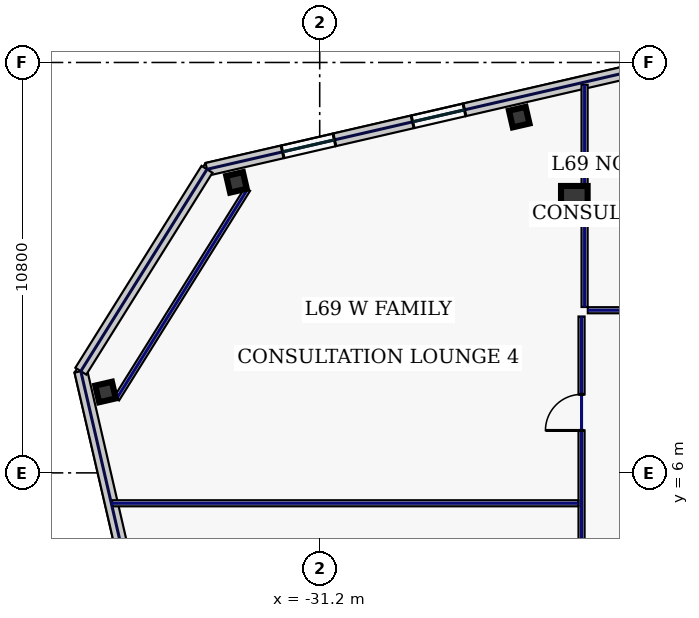
"""IFC4 building model, lengths in metres.
Left out: names, types, materials, properties, quantities, classifications, styles, units other than length and angle.
Written with IfcOpenShell. Run it as: python <this file> out.ifc"""

import sys

from ifc_helpers import new_model, si_unit, direction, frame, frame_2d, origin, origin_2d, place, context, subcontext, project, spatial, rectangle, hollow_rectangle, extrude, element, fill, save


model = new_model("IFC4")
c1 = context("Model", 3, precision=1e-05, world=origin(), true_north=direction((0.0, 1.0)))
c2 = subcontext(c1, "Body", "Model", "MODEL_VIEW")
j1 = project(units=[si_unit("LENGTHUNIT", "METRE"), si_unit("PLANEANGLEUNIT", "RADIAN")], contexts=[c1])
p1 = place(None, origin())
s1 = spatial("IfcSite", under=j1, at=p1, CompositionType="ELEMENT")
p2 = place(p1, origin())
s2 = spatial("IfcBuilding", under=s1, at=p2, CompositionType="ELEMENT")
p3 = place(p2, frame((0.0, 0.0, 297.0)))
s3 = spatial("IfcBuildingStorey", under=s2, at=p3, CompositionType="ELEMENT", Elevation=297.0)
p4 = place(p3, frame((-24.5, 13.2, 0.0), z_axis=(0.0, 0.0, 1.0), x_axis=(1.0, 0.0, 0.0)))
e1 = element("IfcColumn", 1, at=p4, inside=s3, PredefinedType="COLUMN", context=c2, shape_type="SweptSolid", body=[
    extrude(hollow_rectangle(XDim=0.7, YDim=0.7, WallThickness=0.032, at=origin_2d()), origin(), (0.0, 0.0, 1.0), 3.74),
])
for number, where, z_axis, x_axis in (
    (2, (-25.95, 15.362, 0.0), (0.0, 0.0, 1.0), (0.974, 0.225, 0.0)),
    (3, (-33.389, 13.645, 0.0), (0.0, 0.0, 1.0), (0.974, 0.225, 0.0)),
    (4, (-36.836, 8.128, 0.0), (0.0, 0.0, 1.0), (0.974, 0.225, 0.0)),
):
    element("IfcColumn", number, at=place(p3, frame(where, z_axis=z_axis, x_axis=x_axis)), inside=s3, PredefinedType="COLUMN", context=c2, shape_type="SweptSolid", body=[
        extrude(hollow_rectangle(XDim=0.45, YDim=0.45, WallThickness=0.022, at=origin_2d()), origin(), (0.0, 0.0, 1.0), 3.74),
    ])
p5 = place(p3, frame((-17.245, 17.895, 0.0), z_axis=(0.0, 0.0, 1.0), x_axis=(-0.97437318493, -0.224937539085, 0.0)))
e5 = element("IfcWall", 5, at=p5, inside=s3, PredefinedType="STANDARD", context=c2, shape_type="SweptSolid", body=[
    extrude(rectangle(XDim=17.366, YDim=0.34, at=frame_2d((8.683, 0.0))), origin(), (0.0, 0.0, 1.0), 3.74),
])
p6 = place(p5, frame((13.925, 0.0, 1.0)))
e6 = element("IfcOpeningElement", 6, at=p6, cuts=e5, PredefinedType="OPENING", context=c2, shape_type="SweptSolid", body=[
    extrude(rectangle(XDim=1.4, YDim=1.85, at=frame_2d((0.7, 0.925))), frame((0.0, 0.18, 0.0), z_axis=(0.0, -1.0, 0.0), x_axis=(1.0, 0.0, 0.0)), (0.0, 0.0, 1.0), 0.36),
])
p7 = place(p5, frame((10.413, 0.0, 1.0)))
e7 = element("IfcOpeningElement", 7, at=p7, cuts=e5, PredefinedType="OPENING", context=c2, shape_type="SweptSolid", body=[
    extrude(rectangle(XDim=1.4, YDim=1.85, at=frame_2d((0.7, 0.925))), frame((0.0, 0.18, 0.0), z_axis=(0.0, -1.0, 0.0), x_axis=(1.0, 0.0, 0.0)), (0.0, 0.0, 1.0), 0.36),
])
p8 = place(p5, frame((3.329, 0.0, 1.0)))
e8 = element("IfcOpeningElement", 8, at=p8, cuts=e5, PredefinedType="OPENING", context=c2, shape_type="SweptSolid", body=[
    extrude(rectangle(XDim=0.85, YDim=1.85, at=frame_2d((0.425, 0.925))), frame((0.0, 0.18, 0.0), z_axis=(0.0, -1.0, 0.0), x_axis=(1.0, 0.0, 0.0)), (0.0, 0.0, 1.0), 0.36),
])
p9 = place(p3, frame((-37.486, 8.676, 0.0), z_axis=(0.0, 0.0, 1.0), x_axis=(0.224953091034, -0.974369594576, 0.0)))
e9 = element("IfcWall", 9, at=p9, inside=s3, PredefinedType="STANDARD", context=c2, shape_type="SweptSolid", body=[
    extrude(rectangle(XDim=36.2, YDim=0.34, at=frame_2d((18.1, 0.0))), origin(), (0.0, 0.0, 1.0), 3.74),
])
p10 = place(p9, frame((4.825, 0.0, 0.75)))
e10 = element("IfcOpeningElement", 10, at=p10, cuts=e9, PredefinedType="OPENING", context=c2, shape_type="SweptSolid", body=[
    extrude(rectangle(XDim=0.85, YDim=1.85, at=frame_2d((0.425, 0.925))), frame((0.0, 0.18, 0.0), z_axis=(0.0, -1.0, 0.0), x_axis=(1.0, 0.0, 0.0)), (0.0, 0.0, 1.0), 0.36),
])
p11 = place(p9, frame((12.425, 0.0, 0.75)))
e11 = element("IfcOpeningElement", 11, at=p11, cuts=e9, PredefinedType="OPENING", context=c2, shape_type="SweptSolid", body=[
    extrude(rectangle(XDim=0.85, YDim=1.85, at=frame_2d((0.425, 0.925))), frame((0.0, 0.18, 0.0), z_axis=(0.0, -1.0, 0.0), x_axis=(1.0, 0.0, 0.0)), (0.0, 0.0, 1.0), 0.36),
])
p12 = place(p9, frame((21.825, 0.0, 0.58)))
e12 = element("IfcOpeningElement", 12, at=p12, cuts=e9, PredefinedType="OPENING", context=c2, shape_type="SweptSolid", body=[
    extrude(rectangle(XDim=1.6, YDim=2.3, at=frame_2d((0.8, 1.15))), frame((0.0, 0.18, 0.0), z_axis=(0.0, -1.0, 0.0), x_axis=(1.0, 0.0, 0.0)), (0.0, 0.0, 1.0), 0.36),
])
p13 = place(p9, frame((30.875, 0.0, 0.58)))
e13 = element("IfcOpeningElement", 13, at=p13, cuts=e9, PredefinedType="OPENING", context=c2, shape_type="SweptSolid", body=[
    extrude(rectangle(XDim=1.6, YDim=2.3, at=frame_2d((0.8, 1.15))), frame((0.0, 0.18, 0.0), z_axis=(0.0, -1.0, 0.0), x_axis=(1.0, 0.0, 0.0)), (0.0, 0.0, 1.0), 0.36),
])
p14 = place(p3, frame((-34.166, 13.989, 0.0), z_axis=(0.0, 0.0, 1.0), x_axis=(-0.529935887993, -0.848037708252, 0.0)))
e14 = element("IfcWall", 14, at=p14, inside=s3, PredefinedType="STANDARD", context=c2, shape_type="SweptSolid", body=[
    extrude(rectangle(XDim=6.265, YDim=0.34, at=frame_2d((3.133, 0.0))), origin(), (0.0, 0.0, 1.0), 3.74),
])
p15 = place(p3, frame((-33.1, 13.465, 0.0), z_axis=(0.0, 0.0, 1.0), x_axis=(-0.529958457806, -0.848023604035, 0.0)))
e15 = element("IfcWall", 15, at=p15, inside=s3, PredefinedType="PARTITIONING", context=c2, shape_type="SweptSolid", body=[
    extrude(rectangle(XDim=6.505, YDim=0.16, at=frame_2d((3.252, 0.0))), origin(), (0.0, 0.0, 1.0), 3.74),
])
p16 = place(p3, frame((-24.31, -10.015, 0.0), z_axis=(0.0, 0.0, 1.0), x_axis=(0.0, 1.0, 0.0)))
e16 = element("IfcWall", 16, at=p16, inside=s3, PredefinedType="PARTITIONING", context=c2, shape_type="SweptSolid", body=[
    extrude(rectangle(XDim=20.13, YDim=0.16, at=frame_2d((10.065, 0.0))), origin(), (0.0, 0.0, 1.0), 3.74),
])
p17 = place(p16, frame((2.169, 0.0, 0.0)))
e17 = element("IfcOpeningElement", 17, at=p17, cuts=e16, PredefinedType="OPENING", context=c2, shape_type="SweptSolid", body=[
    extrude(rectangle(XDim=0.95, YDim=2.2, at=frame_2d((0.475, 1.1))), frame((0.0, 0.09, 0.0), z_axis=(0.0, -1.0, 0.0), x_axis=(1.0, 0.0, 0.0)), (0.0, 0.0, 1.0), 0.18),
])
p18 = place(p16, frame((6.4, 0.0, 0.0)))
e18 = element("IfcOpeningElement", 18, at=p18, cuts=e16, PredefinedType="OPENING", context=c2, shape_type="SweptSolid", body=[
    extrude(rectangle(XDim=0.95, YDim=2.2, at=frame_2d((0.475, 1.1))), frame((0.0, 0.09, 0.0), z_axis=(0.0, -1.0, 0.0), x_axis=(1.0, 0.0, 0.0)), (0.0, 0.0, 1.0), 0.18),
])
p19 = place(p16, frame((11.6, 0.0, 0.0)))
e19 = element("IfcOpeningElement", 19, at=p19, cuts=e16, PredefinedType="OPENING", context=c2, shape_type="SweptSolid", body=[
    extrude(rectangle(XDim=0.95, YDim=2.2, at=frame_2d((0.475, 1.1))), frame((0.0, 0.09, 0.0), z_axis=(0.0, -1.0, 0.0), x_axis=(1.0, 0.0, 0.0)), (0.0, 0.0, 1.0), 0.18),
])
p20 = place(p16, frame((17.131, 0.0, 0.0)))
e20 = element("IfcOpeningElement", 20, at=p20, cuts=e16, PredefinedType="OPENING", context=c2, shape_type="SweptSolid", body=[
    extrude(rectangle(XDim=0.95, YDim=2.2, at=frame_2d((0.475, 1.1))), frame((0.0, 0.09, 0.0), z_axis=(0.0, -1.0, 0.0), x_axis=(1.0, 0.0, 0.0)), (0.0, 0.0, 1.0), 0.18),
])
p21 = place(p3, frame((-24.145, 10.28, 0.0), z_axis=(0.0, 0.0, 1.0), x_axis=(1.0, 0.0, 0.0)))
e21 = element("IfcWall", 21, at=p21, inside=s3, PredefinedType="PARTITIONING", context=c2, shape_type="SweptSolid", body=[
    extrude(rectangle(XDim=48.29, YDim=0.16, at=frame_2d((24.145, 0.0))), origin(), (0.0, 0.0, 1.0), 3.74),
])
p22 = place(p21, frame((2.044, 0.0, 0.0)))
e22 = element("IfcOpeningElement", 22, at=p22, cuts=e21, PredefinedType="OPENING", context=c2, shape_type="SweptSolid", body=[
    extrude(rectangle(XDim=0.95, YDim=2.2, at=frame_2d((0.475, 1.1))), frame((0.0, 0.09, 0.0), z_axis=(0.0, -1.0, 0.0), x_axis=(1.0, 0.0, 0.0)), (0.0, 0.0, 1.0), 0.18),
])
p23 = place(p21, frame((6.885, 0.0, 0.0)))
e23 = element("IfcOpeningElement", 23, at=p23, cuts=e21, PredefinedType="OPENING", context=c2, shape_type="SweptSolid", body=[
    extrude(rectangle(XDim=0.95, YDim=2.2, at=frame_2d((0.475, 1.1))), frame((0.0, 0.09, 0.0), z_axis=(0.0, -1.0, 0.0), x_axis=(1.0, 0.0, 0.0)), (0.0, 0.0, 1.0), 0.18),
])
p24 = place(p21, frame((14.8, 0.0, 0.0)))
e24 = element("IfcOpeningElement", 24, at=p24, cuts=e21, PredefinedType="OPENING", context=c2, shape_type="SweptSolid", body=[
    extrude(rectangle(XDim=1.3, YDim=2.2, at=frame_2d((0.65, 1.1))), frame((0.0, 0.09, 0.0), z_axis=(0.0, -1.0, 0.0), x_axis=(1.0, 0.0, 0.0)), (0.0, 0.0, 1.0), 0.18),
])
p25 = place(p21, frame((25.58, 0.0, 0.0)))
e25 = element("IfcOpeningElement", 25, at=p25, cuts=e21, PredefinedType="OPENING", context=c2, shape_type="SweptSolid", body=[
    extrude(rectangle(XDim=1.3, YDim=2.2, at=frame_2d((0.65, 1.1))), frame((0.0, 0.09, 0.0), z_axis=(0.0, -1.0, 0.0), x_axis=(1.0, 0.0, 0.0)), (0.0, 0.0, 1.0), 0.18),
])
p26 = place(p21, frame((36.355, 0.0, 0.0)))
e26 = element("IfcOpeningElement", 26, at=p26, cuts=e21, PredefinedType="OPENING", context=c2, shape_type="SweptSolid", body=[
    extrude(rectangle(XDim=0.95, YDim=2.2, at=frame_2d((0.475, 1.1))), frame((0.0, 0.09, 0.0), z_axis=(0.0, -1.0, 0.0), x_axis=(1.0, 0.0, 0.0)), (0.0, 0.0, 1.0), 0.18),
])
p27 = place(p21, frame((44.401, 0.0, 0.0)))
e27 = element("IfcOpeningElement", 27, at=p27, cuts=e21, PredefinedType="OPENING", context=c2, shape_type="SweptSolid", body=[
    extrude(rectangle(XDim=1.3, YDim=2.2, at=frame_2d((0.65, 1.1))), frame((0.0, 0.09, 0.0), z_axis=(0.0, -1.0, 0.0), x_axis=(1.0, 0.0, 0.0)), (0.0, 0.0, 1.0), 0.18),
])
p28 = place(p3, frame((-24.23, 10.365, 0.0), z_axis=(0.0, 0.0, 1.0), x_axis=(0.0, 1.0, 0.0)))
e28 = element("IfcWall", 28, at=p28, inside=s3, PredefinedType="PARTITIONING", context=c2, shape_type="SweptSolid", body=[
    extrude(rectangle(XDim=5.846, YDim=0.16, at=frame_2d((2.923, 0.0))), origin(), (0.0, 0.0, 1.0), 3.74),
])
p29 = place(p3, frame((-36.663, 5.2, 0.0), z_axis=(0.0, 0.0, 1.0), x_axis=(1.0, 0.0, 0.0)))
e29 = element("IfcWall", 29, at=p29, inside=s3, PredefinedType="PARTITIONING", context=c2, shape_type="SweptSolid", body=[
    extrude(rectangle(XDim=12.268, YDim=0.16, at=frame_2d((6.134, 0.0))), origin(), (0.0, 0.0, 1.0), 3.74),
])
p30 = place(p6, origin())
e30 = element("IfcWindow", 30, at=p30, inside=s3, PartitioningType="SINGLE_PANEL", PredefinedType="WINDOW", context=c2, shape_type="SweptSolid", body=[
    extrude(rectangle(XDim=1.4, YDim=1.85, at=frame_2d((0.7, 0.925))), frame((0.0, 0.03, 0.0), z_axis=(0.0, -1.0, 0.0), x_axis=(1.0, 0.0, 0.0)), (0.0, 0.0, 1.0), 0.06),
])
fill(e6, e30)
p31 = place(p7, origin())
e31 = element("IfcWindow", 31, at=p31, inside=s3, PartitioningType="SINGLE_PANEL", PredefinedType="WINDOW", context=c2, shape_type="SweptSolid", body=[
    extrude(rectangle(XDim=1.4, YDim=1.85, at=frame_2d((0.7, 0.925))), frame((0.0, 0.03, 0.0), z_axis=(0.0, -1.0, 0.0), x_axis=(1.0, 0.0, 0.0)), (0.0, 0.0, 1.0), 0.06),
])
fill(e7, e31)
p32 = place(p20, origin())
e32 = element("IfcDoor", 32, at=p32, inside=s3, OperationType="SINGLE_SWING_LEFT", PredefinedType="DOOR", context=c2, shape_type="SweptSolid", body=[
    extrude(rectangle(XDim=0.95, YDim=2.2, at=frame_2d((0.475, 1.1))), frame((0.0, 0.025, 0.0), z_axis=(0.0, -1.0, 0.0), x_axis=(1.0, 0.0, 0.0)), (0.0, 0.0, 1.0), 0.05),
])
fill(e20, e32)
save(model, sys.argv[1])
